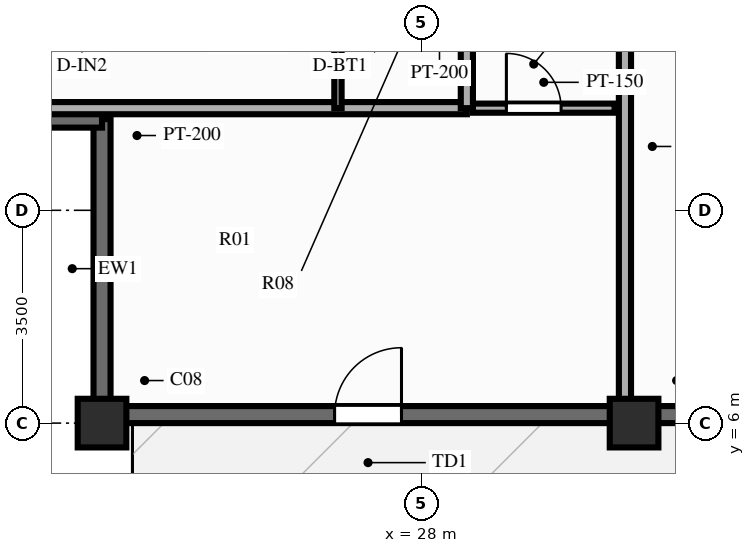
"""IFC4 building model, lengths in metres.
Left out: names, types, materials, properties, quantities, classifications, styles, units other than length and angle.
Written with IfcOpenShell. Run it as: python <this file> out.ifc"""

import sys

from ifc_helpers import new_model, si_unit, direction, frame, frame_2d, origin, origin_2d, place, context, subcontext, project, spatial, rectangle, extrude, source, transform, mapped, element, fill, save


model = new_model("IFC4")
c1 = context("Model", 3, precision=1e-05, world=origin(), true_north=direction((0.0, 1.0)))
c2 = subcontext(c1, "Body", "Model", "MODEL_VIEW")
j1 = project(units=[si_unit("LENGTHUNIT", "METRE"), si_unit("PLANEANGLEUNIT", "RADIAN")], contexts=[c1])
p1 = place(None, origin())
s1 = spatial("IfcSite", under=j1, at=p1, CompositionType="ELEMENT")
p2 = place(p1, origin())
s2 = spatial("IfcBuilding", under=s1, at=p2, CompositionType="ELEMENT")
p3 = place(p2, frame((0.0, 0.0, 189.7)))
s3 = spatial("IfcBuildingStorey", under=s2, at=p3, CompositionType="ELEMENT", Elevation=189.7)
m1 = source(origin(), c2, "Body", "SweptSolid", [
    extrude(rectangle(XDim=0.8, YDim=0.8, at=origin_2d()), origin(), (0.0, 0.0, 1.0), 3.0),
])
for number, where, z_axis, x_axis in (
    (1, (22.75, 6.0, 0.0), (0.0, 0.0, 1.0), (1.0, 0.0, 0.0)),
    (2, (31.5, 6.0, 0.0), (0.0, 0.0, 1.0), (1.0, 0.0, 0.0)),
):
    element("IfcColumn", number, at=place(p3, frame(where, z_axis=z_axis, x_axis=x_axis)), inside=s3, PredefinedType="COLUMN", context=c2, shape_type="MappedRepresentation", body=[
        mapped(m1, transform((0.0, 0.0, 0.0), scale=1.0)),
    ])
p4 = place(p3, frame((22.75, 6.14, 0.0), z_axis=(0.0, 0.0, 1.0), x_axis=(1.0, 0.0, 0.0)))
e3 = element("IfcWall", 3, at=p4, inside=s3, PredefinedType="SOLIDWALL", context=c2, shape_type="SweptSolid", body=[
    extrude(rectangle(XDim=30.5, YDim=0.28, at=frame_2d((15.25, 0.0))), origin(), (0.0, 0.0, 1.0), 2.28),
])
p5 = place(p4, frame((4.925, 0.0, 0.0), z_axis=(0.0, 0.0, 1.0), x_axis=(-1.0, 0.0, 0.0)))
e4 = element("IfcOpeningElement", 4, at=p5, cuts=e3, PredefinedType="OPENING", context=c2, shape_type="SweptSolid", body=[
    extrude(rectangle(XDim=1.1, YDim=2.15, at=frame_2d((0.55, 1.075))), frame((0.0, 0.152, 0.0), z_axis=(0.0, -1.0, 0.0), x_axis=(1.0, 0.0, 0.0)), (0.0, 0.0, 1.0), 0.304),
])
p6 = place(p4, frame((11.387, 0.0, 0.25)))
e5 = element("IfcOpeningElement", 5, at=p6, cuts=e3, PredefinedType="OPENING", context=c2, shape_type="SweptSolid", body=[
    extrude(rectangle(XDim=1.2, YDim=1.5, at=frame_2d((0.6, 0.75))), frame((0.0, 0.152, 0.0), z_axis=(0.0, -1.0, 0.0), x_axis=(1.0, 0.0, 0.0)), (0.0, 0.0, 1.0), 0.304),
])
p7 = place(p4, frame((15.484, 0.0, 0.25)))
e6 = element("IfcOpeningElement", 6, at=p7, cuts=e3, PredefinedType="OPENING", context=c2, shape_type="SweptSolid", body=[
    extrude(rectangle(XDim=1.2, YDim=1.5, at=frame_2d((0.6, 0.75))), frame((0.0, 0.152, 0.0), z_axis=(0.0, -1.0, 0.0), x_axis=(1.0, 0.0, 0.0)), (0.0, 0.0, 1.0), 0.304),
])
p8 = place(p4, frame((17.628, 0.0, 0.25)))
e7 = element("IfcOpeningElement", 7, at=p8, cuts=e3, PredefinedType="OPENING", context=c2, shape_type="SweptSolid", body=[
    extrude(rectangle(XDim=1.2, YDim=1.5, at=frame_2d((0.6, 0.75))), frame((0.0, 0.152, 0.0), z_axis=(0.0, -1.0, 0.0), x_axis=(1.0, 0.0, 0.0)), (0.0, 0.0, 1.0), 0.304),
])
p9 = place(p4, frame((19.791, 0.0, 0.25)))
e8 = element("IfcOpeningElement", 8, at=p9, cuts=e3, PredefinedType="OPENING", context=c2, shape_type="SweptSolid", body=[
    extrude(rectangle(XDim=1.2, YDim=1.5, at=frame_2d((0.6, 0.75))), frame((0.0, 0.152, 0.0), z_axis=(0.0, -1.0, 0.0), x_axis=(1.0, 0.0, 0.0)), (0.0, 0.0, 1.0), 0.304),
])
p10 = place(p4, frame((25.525, 0.0, 0.25)))
e9 = element("IfcOpeningElement", 9, at=p10, cuts=e3, PredefinedType="OPENING", context=c2, shape_type="SweptSolid", body=[
    extrude(rectangle(XDim=1.2, YDim=1.5, at=frame_2d((0.6, 0.75))), frame((0.0, 0.152, 0.0), z_axis=(0.0, -1.0, 0.0), x_axis=(1.0, 0.0, 0.0)), (0.0, 0.0, 1.0), 0.304),
])
for number, where, z_axis, x_axis in (
    (10, (22.75, 6.08, 0.0), (0.0, 0.0, 1.0), (0.0, 1.0, 0.0)),
    (11, (17.83, 11.0, 0.0), (0.0, 0.0, 1.0), (1.0, 0.0, 0.0)),
):
    element("IfcWall", number, at=place(p3, frame(where, z_axis=z_axis, x_axis=x_axis)), inside=s3, PredefinedType="SOLIDWALL", context=c2, shape_type="SweptSolid", body=[
        extrude(rectangle(XDim=4.92, YDim=0.28, at=frame_2d((2.46, 0.0))), origin(), (0.0, 0.0, 1.0), 2.28),
    ])
p11 = place(p3, frame((28.85, 11.18, 0.0), z_axis=(0.0, 0.0, 1.0), x_axis=(1.0, 0.0, 0.0)))
e12 = element("IfcWall", 12, at=p11, inside=s3, PredefinedType="PARTITIONING", context=c2, shape_type="SweptSolid", body=[
    extrude(rectangle(XDim=2.33, YDim=0.15, at=frame_2d((1.165, 0.0))), origin(), (0.0, 0.0, 1.0), 2.79),
])
p12 = place(p11, frame((0.55, 0.0, 0.0)))
e13 = element("IfcOpeningElement", 13, at=p12, cuts=e12, PredefinedType="OPENING", context=c2, shape_type="SweptSolid", body=[
    extrude(rectangle(XDim=0.9, YDim=2.1, at=frame_2d((0.45, 1.05))), frame((0.0, 0.087, 0.0), z_axis=(0.0, -1.0, 0.0), x_axis=(1.0, 0.0, 0.0)), (0.0, 0.0, 1.0), 0.174),
])
p13 = place(p3, frame((31.35, 14.95, 0.0), z_axis=(0.0, 0.0, 1.0), x_axis=(0.0, -1.0, 0.0)))
e14 = element("IfcWall", 14, at=p13, inside=s3, PredefinedType="PARTITIONING", context=c2, shape_type="SweptSolid", body=[
    extrude(rectangle(XDim=8.8, YDim=0.2, at=frame_2d((4.4, 0.0))), origin(), (0.0, 0.0, 1.0), 2.39),
])
p14 = place(p3, frame((28.75, 11.18, 0.0), z_axis=(0.0, 0.0, 1.0), x_axis=(-1.0, 0.0, 0.0)))
e15 = element("IfcWall", 15, at=p14, inside=s3, PredefinedType="PARTITIONING", context=c2, shape_type="SweptSolid", body=[
    extrude(rectangle(XDim=10.85, YDim=0.2, at=frame_2d((5.425, 0.0))), origin(), (0.0, 0.0, 1.0), 2.79),
])
p15 = place(p3, frame((28.75, 11.18, 0.0), z_axis=(0.0, 0.0, 1.0), x_axis=(0.0, 1.0, 0.0)))
e16 = element("IfcWall", 16, at=p15, inside=s3, PredefinedType="PARTITIONING", context=c2, shape_type="SweptSolid", body=[
    extrude(rectangle(XDim=2.215, YDim=0.2, at=frame_2d((1.107, 0.0))), origin(), (0.0, 0.0, 1.0), 2.79),
])
p16 = place(p3, frame((26.63, 11.18, 0.0), z_axis=(0.0, 0.0, 1.0), x_axis=(0.0, 1.0, 0.0)))
e17 = element("IfcWall", 17, at=p16, inside=s3, PredefinedType="PARTITIONING", context=c2, shape_type="SweptSolid", body=[
    extrude(rectangle(XDim=2.215, YDim=0.12, at=frame_2d((1.107, 0.0))), origin(), (0.0, 0.0, 1.0), 2.79),
])
m2 = source(origin(), c2, "Body", "SweptSolid", [
    extrude(rectangle(XDim=1.1, YDim=2.15, at=frame_2d((0.55, 1.075))), frame((0.0, 0.025, 0.0), z_axis=(0.0, -1.0, 0.0), x_axis=(1.0, 0.0, 0.0)), (0.0, 0.0, 1.0), 0.05),
])
p17 = place(p5, origin())
e18 = element("IfcDoor", 18, at=p17, inside=s3, OperationType="SINGLE_SWING_LEFT", PredefinedType="DOOR", context=c2, shape_type="MappedRepresentation", body=[
    mapped(m2, transform((0.0, 0.0, 0.0), scale=1.0)),
])
fill(e4, e18)
m3 = source(origin(), c2, "Body", "SweptSolid", [
    extrude(rectangle(XDim=0.9, YDim=2.1, at=frame_2d((0.45, 1.05))), frame((0.0, 0.025, 0.0), z_axis=(0.0, -1.0, 0.0), x_axis=(1.0, 0.0, 0.0)), (0.0, 0.0, 1.0), 0.05),
])
p18 = place(p12, origin())
e19 = element("IfcDoor", 19, at=p18, inside=s3, OperationType="SINGLE_SWING_LEFT", PredefinedType="DOOR", context=c2, shape_type="MappedRepresentation", body=[
    mapped(m3, transform((0.0, 0.0, 0.0), scale=1.0)),
])
fill(e13, e19)
save(model, sys.argv[1])
